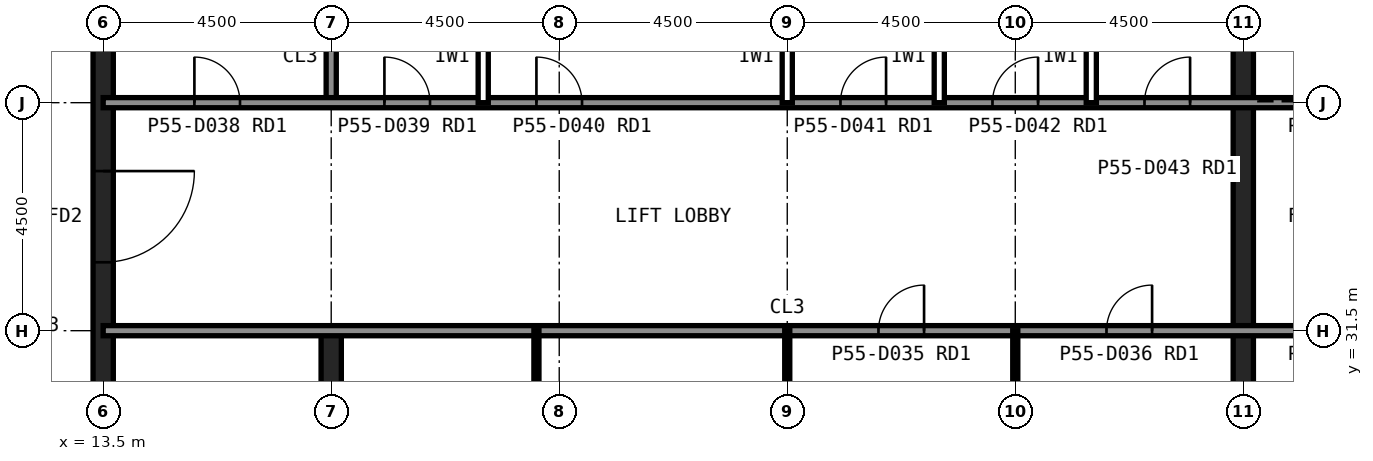
"""IFC4 building model, lengths in metres.
Left out: names, types, materials, properties, quantities, classifications, styles, units other than length and angle.
Written with IfcOpenShell. Run it as: python <this file> out.ifc"""

import sys

from ifc_helpers import new_model, si_unit, direction, frame, frame_2d, origin, place, context, subcontext, project, spatial, rectangle, extrude, element, fill, save


model = new_model("IFC4")
c1 = context("Model", 3, precision=1e-05, world=origin(), true_north=direction((0.0, 1.0)))
c2 = subcontext(c1, "Body", "Model", "MODEL_VIEW")
j1 = project(units=[si_unit("LENGTHUNIT", "METRE"), si_unit("PLANEANGLEUNIT", "RADIAN")], contexts=[c1])
p1 = place(None, origin())
s1 = spatial("IfcSite", under=j1, at=p1, CompositionType="ELEMENT")
p2 = place(p1, origin())
s2 = spatial("IfcBuilding", under=s1, at=p2, CompositionType="ELEMENT")
p3 = place(p2, frame((0.0, 0.0, 230.6)))
s3 = spatial("IfcBuildingStorey", under=s2, at=p3, CompositionType="ELEMENT", Elevation=230.6)
p4 = place(p3, frame((13.5, 40.5, 0.0), z_axis=(0.0, 0.0, 1.0), x_axis=(0.0, -1.0, 0.0)))
e1 = element("IfcWall", 1, at=p4, inside=s3, PredefinedType="SHEAR", context=c2, shape_type="SweptSolid", body=[
    extrude(rectangle(XDim=27.0, YDim=0.4, at=frame_2d((13.5, 0.0))), origin(), (0.0, 0.0, 1.0), 4.0),
])
p5 = place(p4, frame((19.65, 0.0, 0.0)))
e2 = element("IfcOpeningElement", 2, at=p5, cuts=e1, PredefinedType="OPENING", context=c2, shape_type="SweptSolid", body=[
    extrude(rectangle(XDim=1.2, YDim=2.1, at=frame_2d((0.6, 1.05))), frame((0.0, 0.21, 0.0), z_axis=(0.0, -1.0, 0.0), x_axis=(1.0, 0.0, 0.0)), (0.0, 0.0, 1.0), 0.42),
])
p6 = place(p4, frame((5.85, 0.0, 0.0)))
e3 = element("IfcOpeningElement", 3, at=p6, cuts=e1, PredefinedType="OPENING", context=c2, shape_type="SweptSolid", body=[
    extrude(rectangle(XDim=1.8, YDim=2.1, at=frame_2d((0.9, 1.05))), frame((0.0, 0.21, 0.0), z_axis=(0.0, -1.0, 0.0), x_axis=(1.0, 0.0, 0.0)), (0.0, 0.0, 1.0), 0.42),
])
p7 = place(p3, frame((18.0, 13.5, 0.0), z_axis=(0.0, 0.0, 1.0), x_axis=(0.0, 1.0, 0.0)))
e4 = element("IfcWall", 4, at=p7, inside=s3, PredefinedType="SHEAR", context=c2, shape_type="SweptSolid", body=[
    extrude(rectangle(XDim=18.0, YDim=0.4, at=frame_2d((9.0, 0.0))), origin(), (0.0, 0.0, 1.0), 4.0),
])
p8 = place(p3, frame((18.0, 36.0, 0.0), z_axis=(0.0, 0.0, 1.0), x_axis=(0.0, 1.0, 0.0)))
e5 = element("IfcWall", 5, at=p8, inside=s3, PredefinedType="SOLIDWALL", context=c2, shape_type="SweptSolid", body=[
    extrude(rectangle(XDim=4.5, YDim=0.2, at=frame_2d((2.25, 0.0))), origin(), (0.0, 0.0, 1.0), 3.84),
])
p9 = place(p3, frame((36.0, 22.5, 0.0), z_axis=(0.0, 0.0, 1.0), x_axis=(0.0, 1.0, 0.0)))
e6 = element("IfcWall", 6, at=p9, inside=s3, PredefinedType="SHEAR", context=c2, shape_type="SweptSolid", body=[
    extrude(rectangle(XDim=18.0, YDim=0.4, at=frame_2d((9.0, 0.0))), origin(), (0.0, 0.0, 1.0), 4.0),
])
p10 = place(p3, frame((13.5, 36.0, 0.0), z_axis=(0.0, 0.0, 1.0), x_axis=(1.0, 0.0, 0.0)))
e7 = element("IfcWall", 7, at=p10, inside=s3, PredefinedType="SOLIDWALL", context=c2, shape_type="SweptSolid", body=[
    extrude(rectangle(XDim=27.0, YDim=0.2, at=frame_2d((13.5, 0.0))), origin(), (0.0, 0.0, 1.0), 3.84),
])
p11 = place(p10, frame((1.8, 0.0, 0.0)))
e8 = element("IfcOpeningElement", 8, at=p11, cuts=e7, PredefinedType="OPENING", context=c2, shape_type="SweptSolid", body=[
    extrude(rectangle(XDim=0.9, YDim=2.1, at=frame_2d((0.45, 1.05))), frame((0.0, 0.11, 0.0), z_axis=(0.0, -1.0, 0.0), x_axis=(1.0, 0.0, 0.0)), (0.0, 0.0, 1.0), 0.22),
])
p12 = place(p10, frame((5.55, 0.0, 0.0)))
e9 = element("IfcOpeningElement", 9, at=p12, cuts=e7, PredefinedType="OPENING", context=c2, shape_type="SweptSolid", body=[
    extrude(rectangle(XDim=0.9, YDim=2.1, at=frame_2d((0.45, 1.05))), frame((0.0, 0.11, 0.0), z_axis=(0.0, -1.0, 0.0), x_axis=(1.0, 0.0, 0.0)), (0.0, 0.0, 1.0), 0.22),
])
p13 = place(p10, frame((11.55, 0.0, 0.0)))
e10 = element("IfcOpeningElement", 10, at=p13, cuts=e7, PredefinedType="OPENING", context=c2, shape_type="SweptSolid", body=[
    extrude(rectangle(XDim=0.9, YDim=2.1, at=frame_2d((0.45, 1.05))), frame((0.0, 0.11, 0.0), z_axis=(0.0, -1.0, 0.0), x_axis=(1.0, 0.0, 0.0)), (0.0, 0.0, 1.0), 0.22),
])
p14 = place(p10, frame((14.55, 0.0, 0.0)))
e11 = element("IfcOpeningElement", 11, at=p14, cuts=e7, PredefinedType="OPENING", context=c2, shape_type="SweptSolid", body=[
    extrude(rectangle(XDim=0.9, YDim=2.1, at=frame_2d((0.45, 1.05))), frame((0.0, 0.11, 0.0), z_axis=(0.0, -1.0, 0.0), x_axis=(1.0, 0.0, 0.0)), (0.0, 0.0, 1.0), 0.22),
])
p15 = place(p10, frame((24.1, 0.0, 0.0)))
e12 = element("IfcOpeningElement", 12, at=p15, cuts=e7, PredefinedType="OPENING", context=c2, shape_type="SweptSolid", body=[
    extrude(rectangle(XDim=1.3, YDim=2.2, at=frame_2d((0.65, 1.1))), frame((0.0, 0.11, 0.0), z_axis=(0.0, -1.0, 0.0), x_axis=(1.0, 0.0, 0.0)), (0.0, 0.0, 1.0), 0.22),
])
p16 = place(p3, frame((13.5, 31.5, 0.0), z_axis=(0.0, 0.0, 1.0), x_axis=(1.0, 0.0, 0.0)))
e13 = element("IfcWall", 13, at=p16, inside=s3, PredefinedType="SOLIDWALL", context=c2, shape_type="SweptSolid", body=[
    extrude(rectangle(XDim=27.0, YDim=0.2, at=frame_2d((13.5, 0.0))), origin(), (0.0, 0.0, 1.0), 3.84),
])
p17 = place(p16, frame((24.15, 0.0, 0.0)))
e14 = element("IfcOpeningElement", 14, at=p17, cuts=e13, PredefinedType="OPENING", context=c2, shape_type="SweptSolid", body=[
    extrude(rectangle(XDim=1.2, YDim=2.1, at=frame_2d((0.6, 1.05))), frame((0.0, 0.11, 0.0), z_axis=(0.0, -1.0, 0.0), x_axis=(1.0, 0.0, 0.0)), (0.0, 0.0, 1.0), 0.22),
])
p18 = place(p16, frame((15.3, 0.0, 0.0)))
e15 = element("IfcOpeningElement", 15, at=p18, cuts=e13, PredefinedType="OPENING", context=c2, shape_type="SweptSolid", body=[
    extrude(rectangle(XDim=0.9, YDim=2.1, at=frame_2d((0.45, 1.05))), frame((0.0, 0.11, 0.0), z_axis=(0.0, -1.0, 0.0), x_axis=(1.0, 0.0, 0.0)), (0.0, 0.0, 1.0), 0.22),
])
p19 = place(p16, frame((19.8, 0.0, 0.0)))
e16 = element("IfcOpeningElement", 16, at=p19, cuts=e13, PredefinedType="OPENING", context=c2, shape_type="SweptSolid", body=[
    extrude(rectangle(XDim=0.9, YDim=2.1, at=frame_2d((0.45, 1.05))), frame((0.0, 0.11, 0.0), z_axis=(0.0, -1.0, 0.0), x_axis=(1.0, 0.0, 0.0)), (0.0, 0.0, 1.0), 0.22),
])
for number, where, z_axis, x_axis in (
    (17, (24.0, 36.0, 0.0), (0.0, 0.0, 1.0), (0.0, 1.0, 0.0)),
    (18, (27.0, 36.0, 0.0), (0.0, 0.0, 1.0), (0.0, 1.0, 0.0)),
):
    element("IfcWall", number, at=place(p3, frame(where, z_axis=z_axis, x_axis=x_axis)), inside=s3, PredefinedType="PARTITIONING", context=c2, shape_type="SweptSolid", body=[
        extrude(rectangle(XDim=4.5, YDim=0.2, at=frame_2d((2.25, 0.0))), origin(), (0.0, 0.0, 1.0), 3.84),
    ])
for number, where, z_axis, x_axis in (
    (19, (22.05, 22.5, 0.0), (0.0, 0.0, 1.0), (0.0, 1.0, 0.0)),
    (20, (27.0, 22.5, 0.0), (0.0, 0.0, 1.0), (0.0, 1.0, 0.0)),
    (21, (31.5, 22.5, 0.0), (0.0, 0.0, 1.0), (0.0, 1.0, 0.0)),
):
    element("IfcWall", number, at=place(p3, frame(where, z_axis=z_axis, x_axis=x_axis)), inside=s3, PredefinedType="PLUMBINGWALL", context=c2, shape_type="SweptSolid", body=[
        extrude(rectangle(XDim=9.0, YDim=0.1, at=frame_2d((4.5, 0.0))), origin(), (0.0, 0.0, 1.0), 3.84),
    ])
p20 = place(p6, origin())
e22 = element("IfcDoor", 22, at=p20, inside=s3, OperationType="SINGLE_SWING_LEFT", PredefinedType="DOOR", context=c2, shape_type="SweptSolid", body=[
    extrude(rectangle(XDim=1.8, YDim=2.1, at=frame_2d((0.9, 1.05))), frame((0.0, 0.025, 0.0), z_axis=(0.0, -1.0, 0.0), x_axis=(1.0, 0.0, 0.0)), (0.0, 0.0, 1.0), 0.05),
])
fill(e3, e22)
p21 = place(p18, origin())
e23 = element("IfcDoor", 23, at=p21, inside=s3, OperationType="SINGLE_SWING_RIGHT", PredefinedType="DOOR", context=c2, shape_type="SweptSolid", body=[
    extrude(rectangle(XDim=0.9, YDim=2.1, at=frame_2d((0.45, 1.05))), frame((0.0, 0.025, 0.0), z_axis=(0.0, -1.0, 0.0), x_axis=(1.0, 0.0, 0.0)), (0.0, 0.0, 1.0), 0.05),
])
fill(e15, e23)
p22 = place(p19, origin())
e24 = element("IfcDoor", 24, at=p22, inside=s3, OperationType="SINGLE_SWING_RIGHT", PredefinedType="DOOR", context=c2, shape_type="SweptSolid", body=[
    extrude(rectangle(XDim=0.9, YDim=2.1, at=frame_2d((0.45, 1.05))), frame((0.0, 0.025, 0.0), z_axis=(0.0, -1.0, 0.0), x_axis=(1.0, 0.0, 0.0)), (0.0, 0.0, 1.0), 0.05),
])
fill(e16, e24)
p23 = place(p11, origin())
e25 = element("IfcDoor", 25, at=p23, inside=s3, OperationType="SINGLE_SWING_LEFT", PredefinedType="DOOR", context=c2, shape_type="SweptSolid", body=[
    extrude(rectangle(XDim=0.9, YDim=2.1, at=frame_2d((0.45, 1.05))), frame((0.0, 0.025, 0.0), z_axis=(0.0, -1.0, 0.0), x_axis=(1.0, 0.0, 0.0)), (0.0, 0.0, 1.0), 0.05),
])
fill(e8, e25)
p24 = place(p12, origin())
e26 = element("IfcDoor", 26, at=p24, inside=s3, OperationType="SINGLE_SWING_LEFT", PredefinedType="DOOR", context=c2, shape_type="SweptSolid", body=[
    extrude(rectangle(XDim=0.9, YDim=2.1, at=frame_2d((0.45, 1.05))), frame((0.0, 0.025, 0.0), z_axis=(0.0, -1.0, 0.0), x_axis=(1.0, 0.0, 0.0)), (0.0, 0.0, 1.0), 0.05),
])
fill(e9, e26)
p25 = place(p13, origin())
e27 = element("IfcDoor", 27, at=p25, inside=s3, OperationType="SINGLE_SWING_LEFT", PredefinedType="DOOR", context=c2, shape_type="SweptSolid", body=[
    extrude(rectangle(XDim=0.9, YDim=2.1, at=frame_2d((0.45, 1.05))), frame((0.0, 0.025, 0.0), z_axis=(0.0, -1.0, 0.0), x_axis=(1.0, 0.0, 0.0)), (0.0, 0.0, 1.0), 0.05),
])
fill(e10, e27)
p26 = place(p14, origin())
e28 = element("IfcDoor", 28, at=p26, inside=s3, OperationType="SINGLE_SWING_RIGHT", PredefinedType="DOOR", context=c2, shape_type="SweptSolid", body=[
    extrude(rectangle(XDim=0.9, YDim=2.1, at=frame_2d((0.45, 1.05))), frame((0.0, 0.025, 0.0), z_axis=(0.0, -1.0, 0.0), x_axis=(1.0, 0.0, 0.0)), (0.0, 0.0, 1.0), 0.05),
])
fill(e11, e28)
save(model, sys.argv[1])
